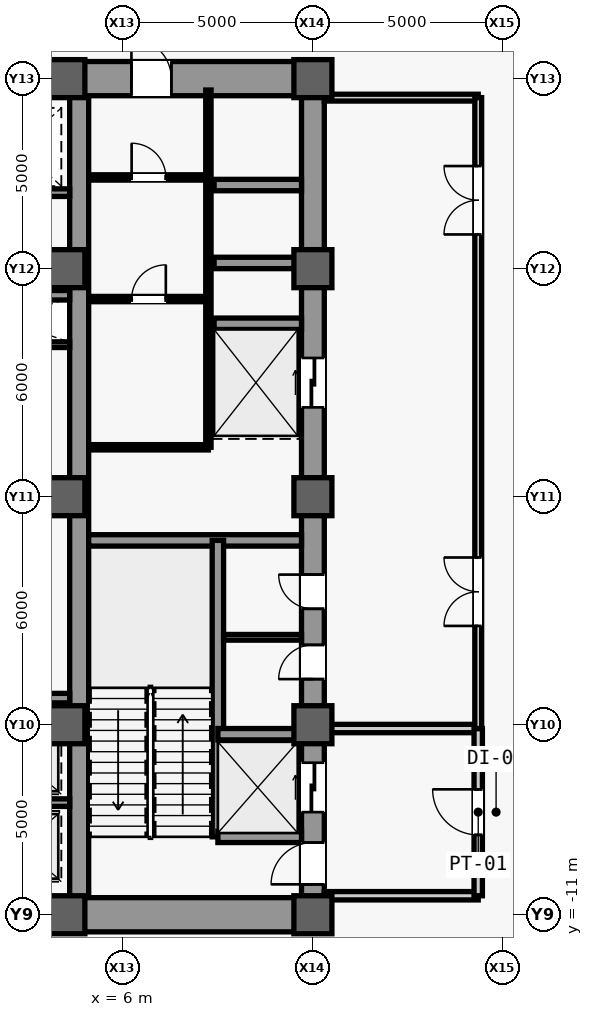
"""IFC4 building model, lengths in metres.
Left out: names, types, materials, properties, quantities, classifications, styles, units other than length and angle.
Written with IfcOpenShell. Run it as: python <this file> out.ifc"""

import sys

from ifc_helpers import new_model, si_unit, direction, frame, frame_2d, origin, origin_2d, place, context, subcontext, project, spatial, rectangle, extrude, source, transform, mapped, element, fill, save


model = new_model("IFC4")
c1 = context("Model", 3, precision=1e-05, world=origin(), true_north=direction((0.0, 1.0)))
c2 = subcontext(c1, "Body", "Model", "MODEL_VIEW")
j1 = project(units=[si_unit("LENGTHUNIT", "METRE"), si_unit("PLANEANGLEUNIT", "RADIAN")], contexts=[c1])
p1 = place(None, origin())
s1 = spatial("IfcSite", under=j1, at=p1, CompositionType="ELEMENT")
p2 = place(p1, origin())
s2 = spatial("IfcBuilding", under=s1, at=p2, CompositionType="ELEMENT")
p3 = place(p2, frame((0.0, 0.0, 6.6)))
s3 = spatial("IfcBuildingStorey", under=s2, at=p3, CompositionType="ELEMENT", Elevation=6.6)
m1 = source(origin(), c2, "Body", "SweptSolid", [
    extrude(rectangle(XDim=22.0, YDim=0.6, at=frame_2d((11.0, 0.0))), origin(), (0.0, 0.0, 1.0), 5.08),
])
p4 = place(p3, frame((11.0, -11.0, 0.0), z_axis=(0.0, 0.0, 1.0), x_axis=(0.0, 1.0, 0.0)))
e1 = element("IfcWall", 1, at=p4, inside=s3, PredefinedType="SHEAR", context=c2, shape_type="MappedRepresentation", body=[
    mapped(m1, transform((0.0, 0.0, 0.0), scale=1.0)),
])
m2 = source(origin(), c2, "Body", "SweptSolid", [
    extrude(rectangle(XDim=1.1, YDim=2.2, at=frame_2d((0.55, 1.1))), frame((0.0, 0.31, 0.0), z_axis=(0.0, -1.0, 0.0), x_axis=(1.0, 0.0, 0.0)), (0.0, 0.0, 1.0), 0.62),
])
p5 = place(p4, frame((0.8, 0.0, 0.0)))
e2 = element("IfcOpeningElement", 2, at=p5, cuts=e1, PredefinedType="OPENING", context=c2, shape_type="MappedRepresentation", body=[
    mapped(m2, transform((0.0, 0.0, 0.0), scale=1.0)),
])
m3 = source(origin(), c2, "Body", "SweptSolid", [
    extrude(rectangle(XDim=0.9, YDim=2.15, at=frame_2d((0.45, 1.075))), frame((0.0, 0.31, 0.0), z_axis=(0.0, -1.0, 0.0), x_axis=(1.0, 0.0, 0.0)), (0.0, 0.0, 1.0), 0.62),
])
p6 = place(p4, frame((6.2, 0.0, 0.0)))
e3 = element("IfcOpeningElement", 3, at=p6, cuts=e1, PredefinedType="OPENING", context=c2, shape_type="MappedRepresentation", body=[
    mapped(m3, transform((0.0, 0.0, 0.0), scale=1.0)),
])
p7 = place(p4, frame((8.05, 0.0, 0.0)))
e4 = element("IfcOpeningElement", 4, at=p7, cuts=e1, PredefinedType="OPENING", context=c2, shape_type="MappedRepresentation", body=[
    mapped(m3, transform((0.0, 0.0, 0.0), scale=1.0)),
])
m4 = source(origin(), c2, "Body", "SweptSolid", [
    extrude(rectangle(XDim=1.3, YDim=2.3, at=frame_2d((0.65, 1.15))), frame((0.0, 0.31, 0.0), z_axis=(0.0, -1.0, 0.0), x_axis=(1.0, 0.0, 0.0)), (0.0, 0.0, 1.0), 0.62),
])
p8 = place(p4, frame((2.7, 0.0, 0.0)))
e5 = element("IfcOpeningElement", 5, at=p8, cuts=e1, PredefinedType="OPENING", context=c2, shape_type="MappedRepresentation", body=[
    mapped(m4, transform((0.0, 0.0, 0.0), scale=1.0)),
])
p9 = place(p4, frame((13.35, 0.0, 0.0)))
e6 = element("IfcOpeningElement", 6, at=p9, cuts=e1, PredefinedType="OPENING", context=c2, shape_type="MappedRepresentation", body=[
    mapped(m4, transform((0.0, 0.0, 0.0), scale=1.0)),
])
m5 = source(origin(), c2, "Body", "SweptSolid", [
    extrude(rectangle(XDim=21.4, YDim=0.5, at=frame_2d((10.7, 0.0))), origin(), (0.0, 0.0, 1.0), 5.08),
])
p10 = place(p3, frame((4.85, -10.7, 0.0), z_axis=(0.0, 0.0, 1.0), x_axis=(0.0, 1.0, 0.0)))
e7 = element("IfcWall", 7, at=p10, inside=s3, PredefinedType="SHEAR", context=c2, shape_type="MappedRepresentation", body=[
    mapped(m5, transform((0.0, 0.0, 0.0), scale=1.0)),
])
m6 = source(origin(), c2, "Body", "SweptSolid", [
    extrude(rectangle(XDim=5.85, YDim=0.9, at=frame_2d((2.925, 0.0))), origin(), (0.0, 0.0, 1.0), 5.08),
])
p11 = place(p3, frame((4.85, -11.0, 0.0), z_axis=(0.0, 0.0, 1.0), x_axis=(1.0, 0.0, 0.0)))
e8 = element("IfcWall", 8, at=p11, inside=s3, PredefinedType="SHEAR", context=c2, shape_type="MappedRepresentation", body=[
    mapped(m6, transform((0.0, 0.0, 0.0), scale=1.0)),
])
p12 = place(p3, frame((4.85, 11.0, 0.0), z_axis=(0.0, 0.0, 1.0), x_axis=(1.0, 0.0, 0.0)))
e9 = element("IfcWall", 9, at=p12, inside=s3, PredefinedType="SHEAR", context=c2, shape_type="MappedRepresentation", body=[
    mapped(m6, transform((0.0, 0.0, 0.0), scale=1.0)),
])
m7 = source(origin(), c2, "Body", "SweptSolid", [
    extrude(rectangle(XDim=1.05, YDim=2.2, at=frame_2d((0.525, 1.1))), frame((0.0, 0.46, 0.0), z_axis=(0.0, -1.0, 0.0), x_axis=(1.0, 0.0, 0.0)), (0.0, 0.0, 1.0), 0.92),
])
p13 = place(p12, frame((1.375, 0.0, 0.0)))
e10 = element("IfcOpeningElement", 10, at=p13, cuts=e9, PredefinedType="OPENING", context=c2, shape_type="MappedRepresentation", body=[
    mapped(m7, transform((0.0, 0.0, 0.0), scale=1.0)),
])
m8 = source(origin(), c2, "Body", "SweptSolid", [
    extrude(rectangle(XDim=5.6, YDim=0.3, at=frame_2d((2.8, 0.0))), origin(), (0.0, 0.0, 1.0), 5.08),
])
p14 = place(p3, frame((5.1, -1.15, 0.0), z_axis=(0.0, 0.0, 1.0), x_axis=(1.0, 0.0, 0.0)))
e11 = element("IfcWall", 11, at=p14, inside=s3, PredefinedType="SHEAR", context=c2, shape_type="MappedRepresentation", body=[
    mapped(m8, transform((0.0, 0.0, 0.0), scale=1.0)),
])
m9 = source(origin(), c2, "Body", "SweptSolid", [
    extrude(rectangle(XDim=9.2, YDim=0.5, at=frame_2d((4.6, 0.0))), origin(), (0.0, 0.0, 1.0), 5.08),
])
p15 = place(p3, frame((-4.6, -11.0, 0.0), z_axis=(0.0, 0.0, 1.0), x_axis=(1.0, 0.0, 0.0)))
e12 = element("IfcWall", 12, at=p15, inside=s3, PredefinedType="SHEAR", context=c2, shape_type="MappedRepresentation", body=[
    mapped(m9, transform((0.0, 0.0, 0.0), scale=1.0)),
])
m10 = source(origin(), c2, "Body", "SweptSolid", [
    extrude(rectangle(XDim=1.8, YDim=2.25, at=frame_2d((0.9, 1.125))), frame((0.0, 0.26, 0.0), z_axis=(0.0, -1.0, 0.0), x_axis=(1.0, 0.0, 0.0)), (0.0, 0.0, 1.0), 0.52),
])
p16 = place(p15, frame((3.7, 0.0, 0.0)))
e13 = element("IfcOpeningElement", 13, at=p16, cuts=e12, PredefinedType="OPENING", context=c2, shape_type="MappedRepresentation", body=[
    mapped(m10, transform((0.0, 0.0, 0.0), scale=1.0)),
])
p17 = place(p3, frame((-4.6, 11.0, 0.0), z_axis=(0.0, 0.0, 1.0), x_axis=(1.0, 0.0, 0.0)))
e14 = element("IfcWall", 14, at=p17, inside=s3, PredefinedType="SHEAR", context=c2, shape_type="MappedRepresentation", body=[
    mapped(m9, transform((0.0, 0.0, 0.0), scale=1.0)),
])
p18 = place(p17, frame((3.7, 0.0, 0.0)))
e15 = element("IfcOpeningElement", 15, at=p18, cuts=e14, PredefinedType="OPENING", context=c2, shape_type="MappedRepresentation", body=[
    mapped(m10, transform((0.0, 0.0, 0.0), scale=1.0)),
])
m11 = source(origin(), c2, "Body", "SweptSolid", [
    extrude(rectangle(XDim=1.0, YDim=1.0, at=origin_2d()), origin(), (0.0, 0.0, 1.0), 5.4),
])
for number, where, z_axis, x_axis in (
    (16, (4.5, -11.0, 0.0), (0.0, 0.0, 1.0), (1.0, 0.0, 0.0)),
    (17, (4.5, -6.0, 0.0), (0.0, 0.0, 1.0), (1.0, 0.0, 0.0)),
    (18, (4.5, 0.0, 0.0), (0.0, 0.0, 1.0), (1.0, 0.0, 0.0)),
    (19, (4.5, 6.0, 0.0), (0.0, 0.0, 1.0), (1.0, 0.0, 0.0)),
    (20, (4.5, 11.0, 0.0), (0.0, 0.0, 1.0), (1.0, 0.0, 0.0)),
    (21, (11.0, -11.0, 0.0), (0.0, 0.0, 1.0), (1.0, 0.0, 0.0)),
    (22, (11.0, -6.0, 0.0), (0.0, 0.0, 1.0), (1.0, 0.0, 0.0)),
    (23, (11.0, 0.0, 0.0), (0.0, 0.0, 1.0), (1.0, 0.0, 0.0)),
    (24, (11.0, 6.0, 0.0), (0.0, 0.0, 1.0), (1.0, 0.0, 0.0)),
    (25, (11.0, 11.0, 0.0), (0.0, 0.0, 1.0), (1.0, 0.0, 0.0)),
):
    element("IfcColumn", number, at=place(p3, frame(where, z_axis=z_axis, x_axis=x_axis)), inside=s3, PredefinedType="COLUMN", context=c2, shape_type="MappedRepresentation", body=[
        mapped(m11, transform((0.0, 0.0, 0.0), scale=1.0)),
    ])
m12 = source(origin(), c2, "Body", "SweptSolid", [
    extrude(rectangle(XDim=7.8, YDim=0.3, at=frame_2d((3.9, 0.0))), origin(), (0.0, 0.0, 1.0), 5.08),
])
p19 = place(p3, frame((8.5, -8.95, 0.0), z_axis=(0.0, 0.0, 1.0), x_axis=(0.0, 1.0, 0.0)))
e26 = element("IfcWall", 26, at=p19, inside=s3, PredefinedType="SHEAR", context=c2, shape_type="MappedRepresentation", body=[
    mapped(m12, transform((0.0, 0.0, 0.0), scale=1.0)),
])
m13 = source(origin(), c2, "Body", "SweptSolid", [
    extrude(rectangle(XDim=2.2, YDim=0.3, at=frame_2d((1.1, 0.0))), origin(), (0.0, 0.0, 1.0), 5.08),
])
for number, where, z_axis, x_axis in (
    (27, (8.5, -8.95, 0.0), (0.0, 0.0, 1.0), (1.0, 0.0, 0.0)),
    (28, (8.5, -6.25, 0.0), (0.0, 0.0, 1.0), (1.0, 0.0, 0.0)),
):
    element("IfcWall", number, at=place(p3, frame(where, z_axis=z_axis, x_axis=x_axis)), inside=s3, PredefinedType="SHEAR", context=c2, shape_type="MappedRepresentation", body=[
        mapped(m13, transform((0.0, 0.0, 0.0), scale=1.0)),
    ])
m14 = source(origin(), c2, "Body", "SweptSolid", [
    extrude(rectangle(XDim=2.3, YDim=0.3, at=frame_2d((1.15, 0.0))), origin(), (0.0, 0.0, 1.0), 5.08),
])
for number, where, z_axis, x_axis in (
    (29, (8.4, 4.55, 0.0), (0.0, 0.0, 1.0), (1.0, 0.0, 0.0)),
    (30, (8.4, 6.15, 0.0), (0.0, 0.0, 1.0), (1.0, 0.0, 0.0)),
    (31, (8.4, 8.2, 0.0), (0.0, 0.0, 1.0), (1.0, 0.0, 0.0)),
):
    element("IfcWall", number, at=place(p3, frame(where, z_axis=z_axis, x_axis=x_axis)), inside=s3, PredefinedType="SHEAR", context=c2, shape_type="MappedRepresentation", body=[
        mapped(m14, transform((0.0, 0.0, 0.0), scale=1.0)),
    ])
m15 = source(origin(), c2, "Body", "SweptSolid", [
    extrude(rectangle(XDim=2.05, YDim=0.15, at=frame_2d((1.025, 0.0))), origin(), (0.0, 0.0, 1.0), 5.08),
])
p20 = place(p3, frame((8.65, -3.7, 0.0), z_axis=(0.0, 0.0, 1.0), x_axis=(1.0, 0.0, 0.0)))
e32 = element("IfcWall", 32, at=p20, inside=s3, PredefinedType="PARTITIONING", context=c2, shape_type="MappedRepresentation", body=[
    mapped(m15, transform((0.0, 0.0, 0.0), scale=1.0)),
])
m16 = source(origin(), c2, "Body", "SweptSolid", [
    extrude(rectangle(XDim=9.4, YDim=0.14, at=frame_2d((4.7, 0.0))), origin(), (0.0, 0.0, 1.0), 5.08),
])
p21 = place(p3, frame((8.25, 1.3, 0.0), z_axis=(0.0, 0.0, 1.0), x_axis=(0.0, 1.0, 0.0)))
e33 = element("IfcWall", 33, at=p21, inside=s3, PredefinedType="PARTITIONING", context=c2, shape_type="MappedRepresentation", body=[
    mapped(m16, transform((0.0, 0.0, 0.0), scale=1.0)),
])
m17 = source(origin(), c2, "Body", "SweptSolid", [
    extrude(rectangle(XDim=3.15, YDim=0.14, at=frame_2d((1.575, 0.0))), origin(), (0.0, 0.0, 1.0), 5.08),
])
p22 = place(p3, frame((5.1, 1.3, 0.0), z_axis=(0.0, 0.0, 1.0), x_axis=(1.0, 0.0, 0.0)))
e34 = element("IfcWall", 34, at=p22, inside=s3, PredefinedType="PARTITIONING", context=c2, shape_type="MappedRepresentation", body=[
    mapped(m17, transform((0.0, 0.0, 0.0), scale=1.0)),
])
p23 = place(p3, frame((5.1, 8.4, 0.0), z_axis=(0.0, 0.0, 1.0), x_axis=(1.0, 0.0, 0.0)))
e35 = element("IfcWall", 35, at=p23, inside=s3, PredefinedType="PARTITIONING", context=c2, shape_type="MappedRepresentation", body=[
    mapped(m17, transform((0.0, 0.0, 0.0), scale=1.0)),
])
m18 = source(origin(), c2, "Body", "SweptSolid", [
    extrude(rectangle(XDim=0.9, YDim=2.15, at=frame_2d((0.45, 1.075))), frame((0.0, 0.08, 0.0), z_axis=(0.0, -1.0, 0.0), x_axis=(1.0, 0.0, 0.0)), (0.0, 0.0, 1.0), 0.16),
])
p24 = place(p23, frame((1.13, 0.0, 0.0)))
e36 = element("IfcOpeningElement", 36, at=p24, cuts=e35, PredefinedType="OPENING", context=c2, shape_type="MappedRepresentation", body=[
    mapped(m18, transform((0.0, 0.0, 0.0), scale=1.0)),
])
p25 = place(p3, frame((5.1, 5.2, 0.0), z_axis=(0.0, 0.0, 1.0), x_axis=(1.0, 0.0, 0.0)))
e37 = element("IfcWall", 37, at=p25, inside=s3, PredefinedType="PARTITIONING", context=c2, shape_type="MappedRepresentation", body=[
    mapped(m17, transform((0.0, 0.0, 0.0), scale=1.0)),
])
p26 = place(p25, frame((1.13, 0.0, 0.0)))
e38 = element("IfcOpeningElement", 38, at=p26, cuts=e37, PredefinedType="OPENING", context=c2, shape_type="MappedRepresentation", body=[
    mapped(m18, transform((0.0, 0.0, 0.0), scale=1.0)),
])
m19 = source(origin(), c2, "Body", "SweptSolid", [
    extrude(rectangle(XDim=4.05, YDim=0.22, at=frame_2d((2.025, 0.0))), origin(), (0.0, 0.0, 1.0), 5.08),
])
for number, where, z_axis, x_axis in (
    (39, (11.3, -10.5, 0.0), (0.0, 0.0, 1.0), (1.0, 0.0, 0.0)),
    (40, (11.3, -6.1, 0.0), (0.0, 0.0, 1.0), (1.0, 0.0, 0.0)),
):
    element("IfcWall", number, at=place(p3, frame(where, z_axis=z_axis, x_axis=x_axis)), inside=s3, PredefinedType="PARTITIONING", context=c2, shape_type="MappedRepresentation", body=[
        mapped(m19, transform((0.0, 0.0, 0.0), scale=1.0)),
    ])
m20 = source(origin(), c2, "Body", "SweptSolid", [
    extrude(rectangle(XDim=4.4, YDim=0.22, at=frame_2d((2.2, 0.0))), origin(), (0.0, 0.0, 1.0), 5.08),
])
p27 = place(p3, frame((15.35, -10.5, 0.0), z_axis=(0.0, 0.0, 1.0), x_axis=(0.0, 1.0, 0.0)))
e41 = element("IfcWall", 41, at=p27, inside=s3, PredefinedType="PARTITIONING", context=c2, shape_type="MappedRepresentation", body=[
    mapped(m20, transform((0.0, 0.0, 0.0), scale=1.0)),
])
m21 = source(origin(), c2, "Body", "SweptSolid", [
    extrude(rectangle(XDim=1.2, YDim=2.2, at=frame_2d((0.6, 1.1))), frame((0.0, 0.12, 0.0), z_axis=(0.0, -1.0, 0.0), x_axis=(1.0, 0.0, 0.0)), (0.0, 0.0, 1.0), 0.24),
])
p28 = place(p27, frame((1.6, 0.0, 0.0)))
e42 = element("IfcOpeningElement", 42, at=p28, cuts=e41, PredefinedType="OPENING", context=c2, shape_type="MappedRepresentation", body=[
    mapped(m21, transform((0.0, 0.0, 0.0), scale=1.0)),
])
m22 = source(origin(), c2, "Body", "SweptSolid", [
    extrude(rectangle(XDim=4.05, YDim=0.18, at=frame_2d((2.025, 0.0))), origin(), (0.0, 0.0, 1.0), 5.08),
])
p29 = place(p3, frame((11.3, 10.5, 0.0), z_axis=(0.0, 0.0, 1.0), x_axis=(1.0, 0.0, 0.0)))
e43 = element("IfcWall", 43, at=p29, inside=s3, PredefinedType="PARTITIONING", context=c2, shape_type="MappedRepresentation", body=[
    mapped(m22, transform((0.0, 0.0, 0.0), scale=1.0)),
])
m23 = source(origin(), c2, "Body", "SweptSolid", [
    extrude(rectangle(XDim=16.6, YDim=0.18, at=frame_2d((8.3, 0.0))), origin(), (0.0, 0.0, 1.0), 5.08),
])
p30 = place(p3, frame((15.35, -6.1, 0.0), z_axis=(0.0, 0.0, 1.0), x_axis=(0.0, 1.0, 0.0)))
e44 = element("IfcWall", 44, at=p30, inside=s3, PredefinedType="PARTITIONING", context=c2, shape_type="MappedRepresentation", body=[
    mapped(m23, transform((0.0, 0.0, 0.0), scale=1.0)),
])
m24 = source(origin(), c2, "Body", "SweptSolid", [
    extrude(rectangle(XDim=1.8, YDim=2.25, at=frame_2d((0.9, 1.125))), frame((0.0, 0.1, 0.0), z_axis=(0.0, -1.0, 0.0), x_axis=(1.0, 0.0, 0.0)), (0.0, 0.0, 1.0), 0.2),
])
p31 = place(p30, frame((2.7, 0.0, 0.0)))
e45 = element("IfcOpeningElement", 45, at=p31, cuts=e44, PredefinedType="OPENING", context=c2, shape_type="MappedRepresentation", body=[
    mapped(m24, transform((0.0, 0.0, 0.0), scale=1.0)),
])
p32 = place(p30, frame((13.0, 0.0, 0.0)))
e46 = element("IfcOpeningElement", 46, at=p32, cuts=e44, PredefinedType="OPENING", context=c2, shape_type="MappedRepresentation", body=[
    mapped(m24, transform((0.0, 0.0, 0.0), scale=1.0)),
])
m25 = source(origin(), c2, "Body", "SweptSolid", [
    extrude(rectangle(XDim=3.45, YDim=0.15, at=frame_2d((1.725, 0.0))), origin(), (0.0, 0.0, 1.0), 5.08),
])
p33 = place(p3, frame((1.15, 4.0, 0.0), z_axis=(0.0, 0.0, 1.0), x_axis=(1.0, 0.0, 0.0)))
e47 = element("IfcWall", 47, at=p33, inside=s3, PredefinedType="PARTITIONING", context=c2, shape_type="MappedRepresentation", body=[
    mapped(m25, transform((0.0, 0.0, 0.0), scale=1.0)),
])
m26 = source(origin(), c2, "Body", "SweptSolid", [
    extrude(rectangle(XDim=2.45, YDim=0.2, at=frame_2d((1.225, 0.0))), origin(), (0.0, 0.0, 1.0), 5.08),
])
p34 = place(p3, frame((2.15, -8.05, 0.0), z_axis=(0.0, 0.0, 1.0), x_axis=(1.0, 0.0, 0.0)))
e48 = element("IfcWall", 48, at=p34, inside=s3, PredefinedType="SHEAR", context=c2, shape_type="MappedRepresentation", body=[
    mapped(m26, transform((0.0, 0.0, 0.0), scale=1.0)),
])
m27 = source(origin(), c2, "Body", "SweptSolid", [
    extrude(rectangle(XDim=9.2, YDim=0.25, at=frame_2d((4.6, 0.0))), origin(), (0.0, 0.0, 1.0), 5.08),
])
p35 = place(p3, frame((-4.6, -5.3, 0.0), z_axis=(0.0, 0.0, 1.0), x_axis=(1.0, 0.0, 0.0)))
e49 = element("IfcWall", 49, at=p35, inside=s3, PredefinedType="SHEAR", context=c2, shape_type="MappedRepresentation", body=[
    mapped(m27, transform((0.0, 0.0, 0.0), scale=1.0)),
])
m28 = source(origin(), c2, "Body", "SweptSolid", [
    extrude(rectangle(XDim=1.05, YDim=2.2, at=frame_2d((0.525, 1.1))), frame((0.0, 0.135, 0.0), z_axis=(0.0, -1.0, 0.0), x_axis=(1.0, 0.0, 0.0)), (0.0, 0.0, 1.0), 0.27),
])
p36 = place(p35, frame((4.075, 0.0, 0.0)))
e50 = element("IfcOpeningElement", 50, at=p36, cuts=e49, PredefinedType="OPENING", context=c2, shape_type="MappedRepresentation", body=[
    mapped(m28, transform((0.0, 0.0, 0.0), scale=1.0)),
])
p37 = place(p3, frame((2.15, 8.0, 0.0), z_axis=(0.0, 0.0, 1.0), x_axis=(1.0, 0.0, 0.0)))
e51 = element("IfcWall", 51, at=p37, inside=s3, PredefinedType="SHEAR", context=c2, shape_type="MappedRepresentation", body=[
    mapped(m26, transform((0.0, 0.0, 0.0), scale=1.0)),
])
p38 = place(p3, frame((-4.6, 5.3, 0.0), z_axis=(0.0, 0.0, 1.0), x_axis=(1.0, 0.0, 0.0)))
e52 = element("IfcWall", 52, at=p38, inside=s3, PredefinedType="SHEAR", context=c2, shape_type="MappedRepresentation", body=[
    mapped(m27, transform((0.0, 0.0, 0.0), scale=1.0)),
])
p39 = place(p38, frame((4.075, 0.0, 0.0)))
e53 = element("IfcOpeningElement", 53, at=p39, cuts=e52, PredefinedType="OPENING", context=c2, shape_type="MappedRepresentation", body=[
    mapped(m28, transform((0.0, 0.0, 0.0), scale=1.0)),
])
m29 = source(origin(), c2, "Body", "SweptSolid", [
    extrude(rectangle(XDim=1.1, YDim=2.2, at=frame_2d((0.55, 1.1))), frame((0.0, 0.025, 0.0), z_axis=(0.0, -1.0, 0.0), x_axis=(1.0, 0.0, 0.0)), (0.0, 0.0, 1.0), 0.05),
])
p40 = place(p5, origin())
e54 = element("IfcDoor", 54, at=p40, inside=s3, OperationType="SINGLE_SWING_LEFT", PredefinedType="DOOR", context=c2, shape_type="MappedRepresentation", body=[
    mapped(m29, transform((0.0, 0.0, 0.0), scale=1.0)),
])
fill(e2, e54)
m30 = source(origin(), c2, "Body", "SweptSolid", [
    extrude(rectangle(XDim=0.9, YDim=2.15, at=frame_2d((0.45, 1.075))), frame((0.0, 0.025, 0.0), z_axis=(0.0, -1.0, 0.0), x_axis=(1.0, 0.0, 0.0)), (0.0, 0.0, 1.0), 0.05),
])
p41 = place(p6, origin())
e55 = element("IfcDoor", 55, at=p41, inside=s3, OperationType="SINGLE_SWING_LEFT", PredefinedType="DOOR", context=c2, shape_type="MappedRepresentation", body=[
    mapped(m30, transform((0.0, 0.0, 0.0), scale=1.0)),
])
fill(e3, e55)
p42 = place(p7, origin())
e56 = element("IfcDoor", 56, at=p42, inside=s3, OperationType="SINGLE_SWING_RIGHT", PredefinedType="DOOR", context=c2, shape_type="MappedRepresentation", body=[
    mapped(m30, transform((0.0, 0.0, 0.0), scale=1.0)),
])
fill(e4, e56)
m31 = source(origin(), c2, "Body", "SweptSolid", [
    extrude(rectangle(XDim=1.05, YDim=2.2, at=frame_2d((0.525, 1.1))), frame((0.0, 0.025, 0.0), z_axis=(0.0, -1.0, 0.0), x_axis=(1.0, 0.0, 0.0)), (0.0, 0.0, 1.0), 0.05),
])
p43 = place(p13, origin())
e57 = element("IfcDoor", 57, at=p43, inside=s3, OperationType="SINGLE_SWING_LEFT", PredefinedType="DOOR", context=c2, shape_type="MappedRepresentation", body=[
    mapped(m31, transform((0.0, 0.0, 0.0), scale=1.0)),
])
fill(e10, e57)
p44 = place(p24, origin())
e58 = element("IfcDoor", 58, at=p44, inside=s3, OperationType="SINGLE_SWING_LEFT", PredefinedType="DOOR", context=c2, shape_type="MappedRepresentation", body=[
    mapped(m30, transform((0.0, 0.0, 0.0), scale=1.0)),
])
fill(e36, e58)
p45 = place(p26, origin())
e59 = element("IfcDoor", 59, at=p45, inside=s3, OperationType="SINGLE_SWING_RIGHT", PredefinedType="DOOR", context=c2, shape_type="MappedRepresentation", body=[
    mapped(m30, transform((0.0, 0.0, 0.0), scale=1.0)),
])
fill(e38, e59)
m32 = source(origin(), c2, "Body", "SweptSolid", [
    extrude(rectangle(XDim=1.2, YDim=2.2, at=frame_2d((0.6, 1.1))), frame((0.0, 0.025, 0.0), z_axis=(0.0, -1.0, 0.0), x_axis=(1.0, 0.0, 0.0)), (0.0, 0.0, 1.0), 0.05),
])
p46 = place(p28, origin())
e60 = element("IfcDoor", 60, at=p46, inside=s3, OperationType="SINGLE_SWING_RIGHT", PredefinedType="DOOR", context=c2, shape_type="MappedRepresentation", body=[
    mapped(m32, transform((0.0, 0.0, 0.0), scale=1.0)),
])
fill(e42, e60)
m33 = source(origin(), c2, "Body", "SweptSolid", [
    extrude(rectangle(XDim=1.8, YDim=2.25, at=frame_2d((0.9, 1.125))), frame((0.0, 0.025, 0.0), z_axis=(0.0, -1.0, 0.0), x_axis=(1.0, 0.0, 0.0)), (0.0, 0.0, 1.0), 0.05),
])
p47 = place(p31, origin())
e61 = element("IfcDoor", 61, at=p47, inside=s3, OperationType="SINGLE_SWING_RIGHT", PredefinedType="DOOR", context=c2, shape_type="MappedRepresentation", body=[
    mapped(m33, transform((0.0, 0.0, 0.0), scale=1.0)),
])
fill(e45, e61)
p48 = place(p32, origin())
e62 = element("IfcDoor", 62, at=p48, inside=s3, OperationType="SINGLE_SWING_LEFT", PredefinedType="DOOR", context=c2, shape_type="MappedRepresentation", body=[
    mapped(m33, transform((0.0, 0.0, 0.0), scale=1.0)),
])
fill(e46, e62)
m34 = source(origin(), c2, "Body", "SweptSolid", [
    extrude(rectangle(XDim=1.3, YDim=2.3, at=frame_2d((0.65, 1.15))), frame((0.0, 0.025, 0.0), z_axis=(0.0, -1.0, 0.0), x_axis=(1.0, 0.0, 0.0)), (0.0, 0.0, 1.0), 0.05),
])
p49 = place(p8, origin())
e63 = element("IfcDoor", 63, at=p49, inside=s3, OperationType="SLIDING_TO_LEFT", PredefinedType="DOOR", context=c2, shape_type="MappedRepresentation", body=[
    mapped(m34, transform((0.0, 0.0, 0.0), scale=1.0)),
])
fill(e5, e63)
p50 = place(p9, origin())
e64 = element("IfcDoor", 64, at=p50, inside=s3, OperationType="SLIDING_TO_LEFT", PredefinedType="DOOR", context=c2, shape_type="MappedRepresentation", body=[
    mapped(m34, transform((0.0, 0.0, 0.0), scale=1.0)),
])
fill(e6, e64)
save(model, sys.argv[1])
